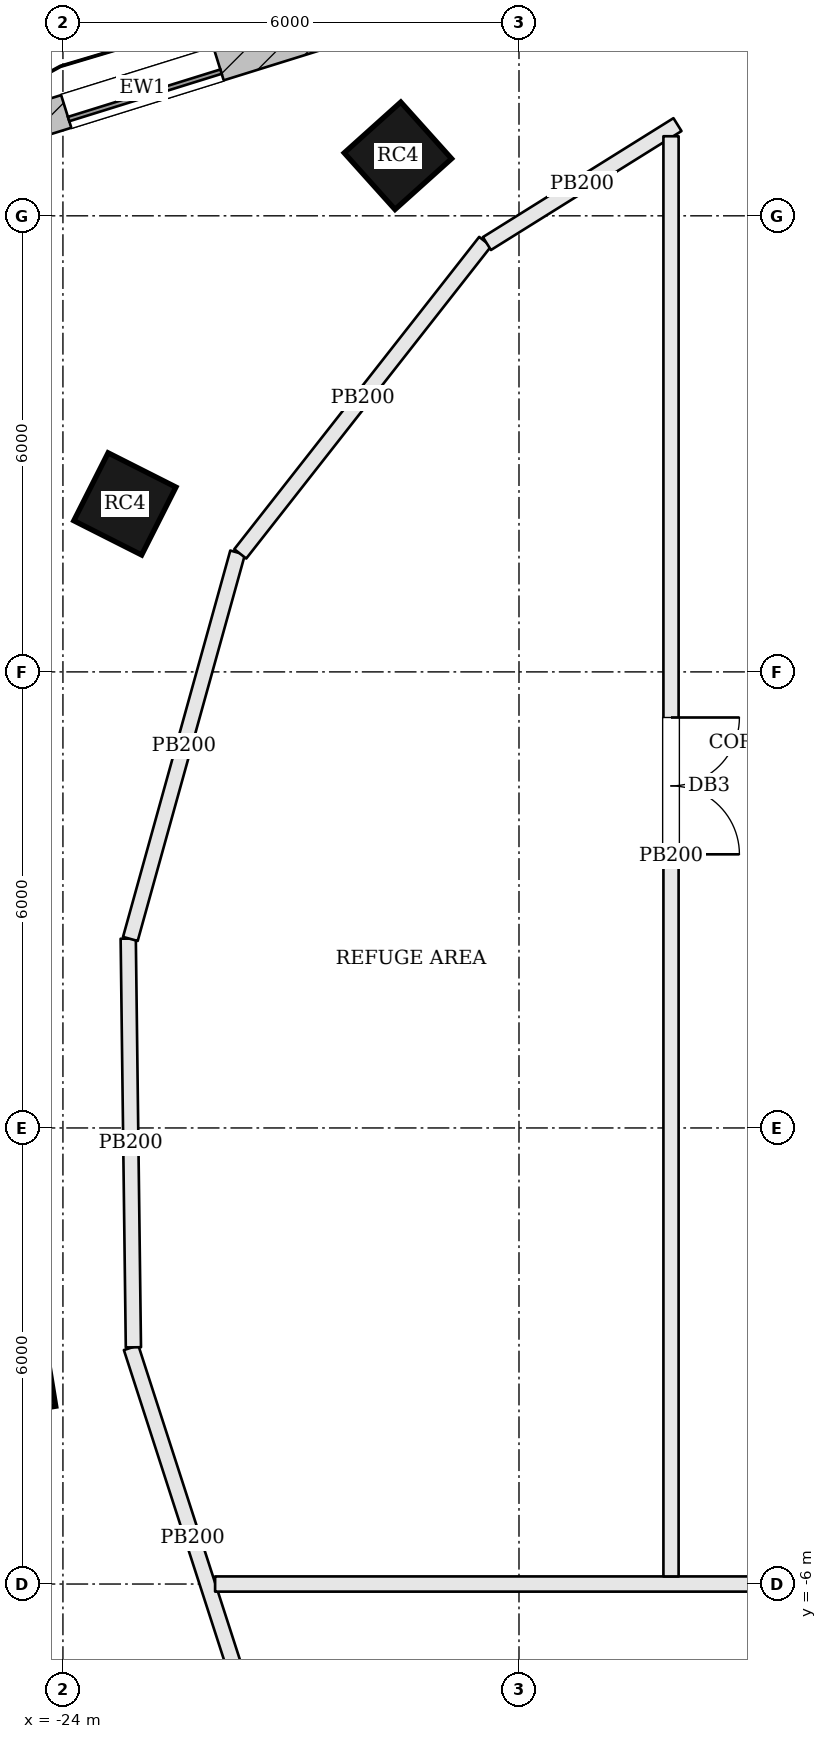
"""IFC4 building model, lengths in metres.
Left out: names, types, materials, properties, quantities, classifications, styles, units other than length and angle.
Written with IfcOpenShell. Run it as: python <this file> out.ifc"""

import sys

from ifc_helpers import new_model, si_unit, direction, frame, frame_2d, origin, origin_2d, place, context, subcontext, project, spatial, rectangle, extrude, element, fill, save


model = new_model("IFC4")
c1 = context("Model", 3, precision=1e-05, world=origin(), true_north=direction((0.0, 1.0)))
c2 = subcontext(c1, "Body", "Model", "MODEL_VIEW")
j1 = project(units=[si_unit("LENGTHUNIT", "METRE"), si_unit("PLANEANGLEUNIT", "RADIAN")], contexts=[c1])
p1 = place(None, origin())
s1 = spatial("IfcSite", under=j1, at=p1, CompositionType="ELEMENT")
p2 = place(p1, origin())
s2 = spatial("IfcBuilding", under=s1, at=p2, CompositionType="ELEMENT")
p3 = place(p2, frame((0.0, 0.0, 240.9)))
s3 = spatial("IfcBuildingStorey", under=s2, at=p3, CompositionType="ELEMENT", Elevation=240.9)
for number, where, z_axis, x_axis in (
    (1, (-19.593, 12.79, 0.0), (0.0, 0.0, 1.0), (-0.744, -0.668, 0.0)),
    (2, (-23.185, 8.21, 0.0), (0.0, 0.0, 1.0), (-0.451, -0.893, 0.0)),
    (3, (-24.669, -3.248, 0.0), (0.0, 0.0, 1.0), (0.162, -0.987, 0.0)),
):
    element("IfcColumn", number, at=place(p3, frame(where, z_axis=z_axis, x_axis=x_axis)), inside=s3, PredefinedType="COLUMN", context=c2, shape_type="SweptSolid", body=[
        extrude(rectangle(XDim=1.0, YDim=1.0, at=origin_2d()), origin(), (0.0, 0.0, 1.0), 3.9),
    ])
p4 = place(p3, frame((-20.316, 14.507, 0.0), z_axis=(0.0, 0.0, 1.0), x_axis=(-0.954807195185, -0.297225873743, 0.0)))
e4 = element("IfcWall", 4, at=p4, inside=s3, PredefinedType="SOLIDWALL", context=c2, shape_type="SweptSolid", body=[
    extrude(rectangle(XDim=5.526, YDim=0.45, at=frame_2d((2.763, 0.0))), origin(), (0.0, 0.0, 1.0), 3.7),
])
p5 = place(p4, frame((1.713, 0.0, 0.9)))
e5 = element("IfcOpeningElement", 5, at=p5, cuts=e4, PredefinedType="OPENING", context=c2, shape_type="SweptSolid", body=[
    extrude(rectangle(XDim=2.1, YDim=2.3, at=frame_2d((1.05, 1.15))), frame((0.0, 0.235, 0.0), z_axis=(0.0, -1.0, 0.0), x_axis=(1.0, 0.0, 0.0)), (0.0, 0.0, 1.0), 0.47),
])
p6 = place(p3, frame((-21.486, -7.895, 0.0), z_axis=(0.0, 0.0, 1.0), x_axis=(-0.307481575482, 0.951554034587, 0.0)))
e6 = element("IfcWall", 6, at=p6, inside=s3, PredefinedType="PARTITIONING", context=c2, shape_type="SweptSolid", body=[
    extrude(rectangle(XDim=5.259, YDim=0.2, at=frame_2d((2.629, 0.0))), origin(), (0.0, 0.0, 1.0), 3.7),
])
p7 = place(p3, frame((-21.998, -6.0, 0.0), z_axis=(0.0, 0.0, 1.0), x_axis=(1.0, 0.0, 0.0)))
e7 = element("IfcWall", 7, at=p7, inside=s3, PredefinedType="PARTITIONING", context=c2, shape_type="SweptSolid", body=[
    extrude(rectangle(XDim=44.036, YDim=0.2, at=frame_2d((22.018, 0.0))), origin(), (0.0, 0.0, 1.0), 3.7),
])
p8 = place(p7, frame((21.098, 0.0, 0.0)))
e8 = element("IfcOpeningElement", 8, at=p8, cuts=e7, PredefinedType="OPENING", context=c2, shape_type="SweptSolid", body=[
    extrude(rectangle(XDim=1.8, YDim=2.1, at=frame_2d((0.9, 1.05))), frame((0.0, 0.11, 0.0), z_axis=(0.0, -1.0, 0.0), x_axis=(1.0, 0.0, 0.0)), (0.0, 0.0, 1.0), 0.22),
])
p9 = place(p3, frame((-23.073, -2.886, 0.0), z_axis=(0.0, 0.0, 1.0), x_axis=(-0.012666982201, 0.999919770563, 0.0)))
e9 = element("IfcWall", 9, at=p9, inside=s3, PredefinedType="PARTITIONING", context=c2, shape_type="SweptSolid", body=[
    extrude(rectangle(XDim=5.377, YDim=0.2, at=frame_2d((2.689, 0.0))), origin(), (0.0, 0.0, 1.0), 3.7),
])
p10 = place(p3, frame((-23.113, 2.487, 0.0), z_axis=(0.0, 0.0, 1.0), x_axis=(0.267500643582, 0.963557681555, 0.0)))
e10 = element("IfcWall", 10, at=p10, inside=s3, PredefinedType="PARTITIONING", context=c2, shape_type="SweptSolid", body=[
    extrude(rectangle(XDim=5.275, YDim=0.2, at=frame_2d((2.638, 0.0))), origin(), (0.0, 0.0, 1.0), 3.7),
])
p11 = place(p3, frame((-21.667, 7.553, 0.0), z_axis=(0.0, 0.0, 1.0), x_axis=(0.617143909163, 0.786850300491, 0.0)))
e11 = element("IfcWall", 11, at=p11, inside=s3, PredefinedType="PARTITIONING", context=c2, shape_type="SweptSolid", body=[
    extrude(rectangle(XDim=5.221, YDim=0.2, at=frame_2d((2.61, 0.0))), origin(), (0.0, 0.0, 1.0), 3.7),
])
p12 = place(p3, frame((-18.422, 11.635, 0.0), z_axis=(0.0, 0.0, 1.0), x_axis=(0.848299824463, 0.529516201656, 0.0)))
e12 = element("IfcWall", 12, at=p12, inside=s3, PredefinedType="PARTITIONING", context=c2, shape_type="SweptSolid", body=[
    extrude(rectangle(XDim=2.955, YDim=0.2, at=frame_2d((1.478, 0.0))), origin(), (0.0, 0.0, 1.0), 3.7),
])
p13 = place(p3, frame((-16.0, 13.047, 0.0), z_axis=(0.0, 0.0, 1.0), x_axis=(0.0, -1.0, 0.0)))
e13 = element("IfcWall", 13, at=p13, inside=s3, PredefinedType="PARTITIONING", context=c2, shape_type="SweptSolid", body=[
    extrude(rectangle(XDim=18.947, YDim=0.2, at=frame_2d((9.474, 0.0))), origin(), (0.0, 0.0, 1.0), 3.7),
])
p14 = place(p13, frame((7.647, 0.0, 0.0)))
e14 = element("IfcOpeningElement", 14, at=p14, cuts=e13, PredefinedType="OPENING", context=c2, shape_type="SweptSolid", body=[
    extrude(rectangle(XDim=1.8, YDim=2.1, at=frame_2d((0.9, 1.05))), frame((0.0, 0.11, 0.0), z_axis=(0.0, -1.0, 0.0), x_axis=(1.0, 0.0, 0.0)), (0.0, 0.0, 1.0), 0.22),
])
p15 = place(p5, origin())
e15 = element("IfcWindow", 15, at=p15, inside=s3, PartitioningType="SINGLE_PANEL", PredefinedType="WINDOW", context=c2, shape_type="SweptSolid", body=[
    extrude(rectangle(XDim=2.1, YDim=2.3, at=frame_2d((1.05, 1.15))), frame((0.0, 0.135, 0.0), z_axis=(0.0, -1.0, 0.0), x_axis=(1.0, 0.0, 0.0)), (0.0, 0.0, 1.0), 0.06),
])
fill(e5, e15)
p16 = place(p14, origin())
e16 = element("IfcDoor", 16, at=p16, inside=s3, OperationType="DOUBLE_DOOR_SINGLE_SWING", PredefinedType="DOOR", context=c2, shape_type="SweptSolid", body=[
    extrude(rectangle(XDim=1.8, YDim=2.1, at=frame_2d((0.9, 1.05))), frame((0.0, 0.025, 0.0), z_axis=(0.0, -1.0, 0.0), x_axis=(1.0, 0.0, 0.0)), (0.0, 0.0, 1.0), 0.05),
])
fill(e14, e16)
save(model, sys.argv[1])
